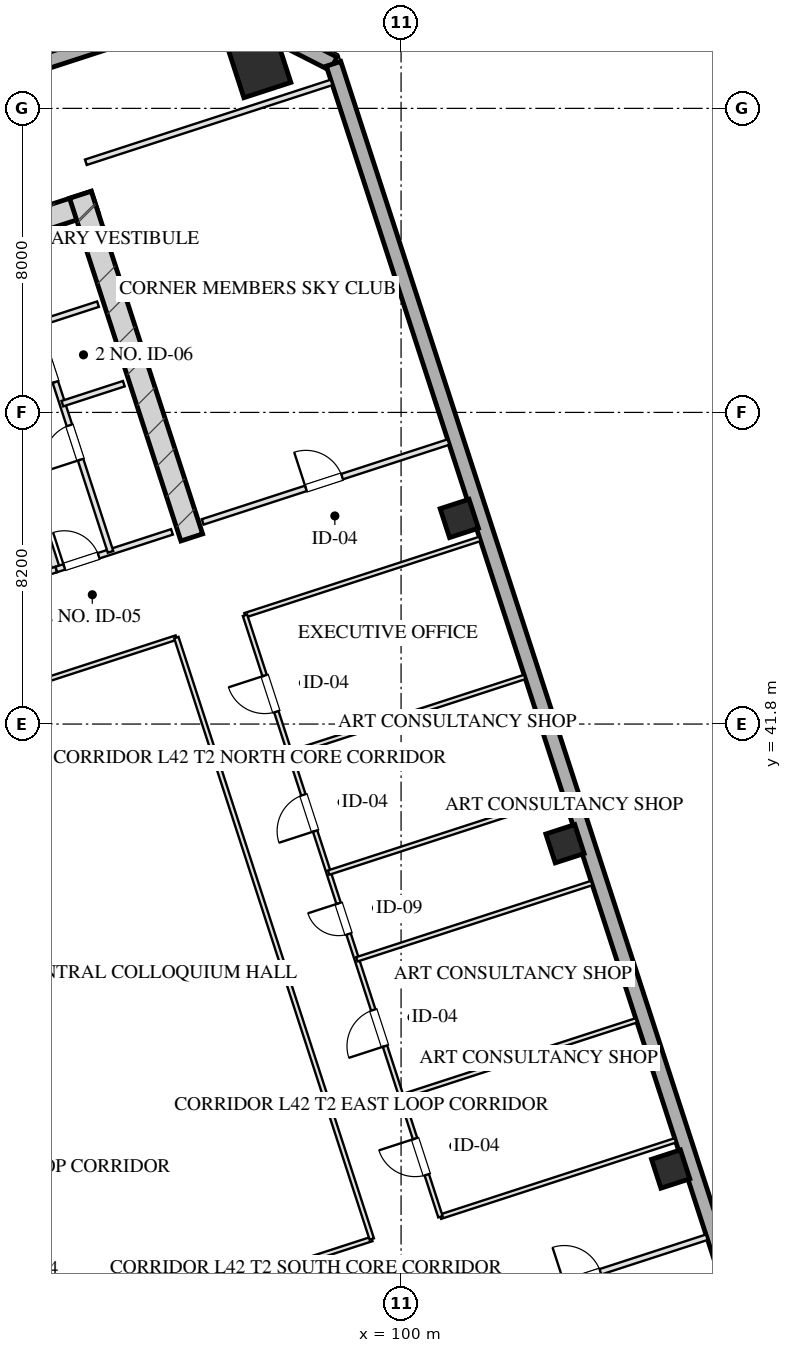
"""IFC4 building model, lengths in metres.
Left out: names, types, materials, properties, quantities, classifications, styles, units other than length and angle.
Written with IfcOpenShell. Run it as: python <this file> out.ifc"""

import sys

from ifc_helpers import new_model, si_unit, direction, frame, frame_2d, origin, origin_2d, place, context, subcontext, project, spatial, rectangle, hollow_rectangle, extrude, element, fill, save


model = new_model("IFC4")
c1 = context("Model", 3, precision=1e-05, world=origin(), true_north=direction((0.0, 1.0)))
c2 = subcontext(c1, "Body", "Model", "MODEL_VIEW")
j1 = project(units=[si_unit("LENGTHUNIT", "METRE"), si_unit("PLANEANGLEUNIT", "RADIAN")], contexts=[c1])
p1 = place(None, origin())
s1 = spatial("IfcSite", under=j1, at=p1, CompositionType="ELEMENT")
p2 = place(p1, origin())
s2 = spatial("IfcBuilding", under=s1, at=p2, CompositionType="ELEMENT")
p3 = place(p2, frame((0.0, 0.0, 159.85)))
s3 = spatial("IfcBuildingStorey", under=s2, at=p3, CompositionType="ELEMENT", Elevation=159.85)
p4 = place(p3, frame((76.344, 50.466, 0.0), z_axis=(0.0, 0.0, 1.0), x_axis=(0.951055727519, 0.309019421968, 0.0)))
e1 = element("IfcWall", 1, at=p4, inside=s3, PredefinedType="SHEAR", context=c2, shape_type="SweptSolid", body=[
    extrude(rectangle(XDim=16.4, YDim=0.6, at=frame_2d((8.2, 0.0))), origin(), (0.0, 0.0, 1.0), 3.45),
])
p5 = place(p3, frame((94.492, 46.71, 0.0), z_axis=(0.0, 0.0, 1.0), x_axis=(-0.309010370028, 0.95105866865, 0.0)))
e2 = element("IfcWall", 2, at=p5, inside=s3, PredefinedType="SHEAR", context=c2, shape_type="SweptSolid", body=[
    extrude(rectangle(XDim=9.48, YDim=0.6, at=frame_2d((4.74, 0.0))), origin(), (0.0, 0.0, 1.0), 3.45),
])
p6 = place(p3, frame((96.281, 59.099, 0.0), z_axis=(0.0, 0.0, 1.0), x_axis=(0.951056516295, 0.309016994375, 0.0)))
e3 = element("IfcColumn", 3, at=p6, inside=s3, PredefinedType="COLUMN", context=c2, shape_type="SweptSolid", body=[
    extrude(hollow_rectangle(XDim=1.3, YDim=1.3, WallThickness=0.045, at=origin_2d()), origin(), (0.0, 0.0, 1.0), 3.451),
])
for number, where, z_axis, x_axis in (
    (4, (107.094, 30.091, 0.0), (0.0, 0.0, 1.0), (0.951, 0.309, 0.0)),
    (5, (104.313, 38.651, 0.0), (0.0, 0.0, 1.0), (0.951, 0.309, 0.0)),
    (6, (101.532, 47.21, 0.0), (0.0, 0.0, 1.0), (0.951, 0.309, 0.0)),
):
    element("IfcColumn", number, at=place(p3, frame(where, z_axis=z_axis, x_axis=x_axis)), inside=s3, PredefinedType="COLUMN", context=c2, shape_type="SweptSolid", body=[
        extrude(hollow_rectangle(XDim=0.8, YDim=0.8, WallThickness=0.028, at=origin_2d()), origin(), (0.0, 0.0, 1.0), 3.451),
    ])
p7 = place(p3, frame((70.092, 52.556, 0.0), z_axis=(0.0, 0.0, 1.0), x_axis=(0.951057580055, 0.30901372044, 0.0)))
e7 = element("IfcWall", 7, at=p7, inside=s3, PredefinedType="SOLIDWALL", context=c2, shape_type="SweptSolid", body=[
    extrude(rectangle(XDim=26.4, YDim=0.4, at=frame_2d((13.2, 0.0))), origin(), (0.0, 0.0, 1.0), 2.61),
])
p8 = place(p3, frame((95.199, 60.714, 0.0), z_axis=(0.0, 0.0, 1.0), x_axis=(0.891020832027, -0.453962417932, 0.0)))
e8 = element("IfcWall", 8, at=p8, inside=s3, PredefinedType="SOLIDWALL", context=c2, shape_type="SweptSolid", body=[
    extrude(rectangle(XDim=3.394, YDim=0.4, at=frame_2d((1.697, 0.0))), origin(), (0.0, 0.0, 1.0), 2.61),
])
p9 = place(p3, frame((98.224, 59.173, 0.0), z_axis=(0.0, 0.0, 1.0), x_axis=(0.309014228706, -0.951057414911, 0.0)))
e9 = element("IfcWall", 9, at=p9, inside=s3, PredefinedType="SOLIDWALL", context=c2, shape_type="SweptSolid", body=[
    extrude(rectangle(XDim=42.8, YDim=0.4, at=frame_2d((21.4, 0.0))), origin(), (0.0, 0.0, 1.0), 2.61),
])
p10 = place(p3, frame((90.928, 45.868, 0.0), z_axis=(0.0, 0.0, 1.0), x_axis=(-0.309042196757, 0.951048327176, 0.0)))
e10 = element("IfcWall", 10, at=p10, inside=s3, PredefinedType="PARTITIONING", context=c2, shape_type="SweptSolid", body=[
    extrude(rectangle(XDim=8.43, YDim=0.2, at=frame_2d((4.215, 0.0))), origin(), (0.0, 0.0, 1.0), 3.175),
])
p11 = place(p3, frame((86.743, 44.508, 0.0), z_axis=(0.0, 0.0, 1.0), x_axis=(0.951063829732, 0.308994485023, 0.0)))
e11 = element("IfcWall", 11, at=p11, inside=s3, PredefinedType="PARTITIONING", context=c2, shape_type="SweptSolid", body=[
    extrude(rectangle(XDim=4.4, YDim=0.15, at=frame_2d((2.2, 0.0))), origin(), (0.0, 0.0, 1.0), 3.175),
])
p12 = place(p11, frame((1.45, 0.0, 0.0)))
e12 = element("IfcOpeningElement", 12, at=p12, cuts=e11, PredefinedType="OPENING", context=c2, shape_type="SweptSolid", body=[
    extrude(rectangle(XDim=1.5, YDim=2.05, at=frame_2d((0.75, 1.025))), frame((0.0, 0.085, 0.0), z_axis=(0.0, -1.0, 0.0), x_axis=(1.0, 0.0, 0.0)), (0.0, 0.0, 1.0), 0.17),
])
p13 = place(p3, frame((90.928, 45.868, 0.0), z_axis=(0.0, 0.0, 1.0), x_axis=(0.951059297078, 0.309008435874, 0.0)))
e13 = element("IfcWall", 13, at=p13, inside=s3, PredefinedType="PARTITIONING", context=c2, shape_type="SweptSolid", body=[
    extrude(rectangle(XDim=3.2, YDim=0.15, at=frame_2d((1.6, 0.0))), origin(), (0.0, 0.0, 1.0), 3.175),
])
p14 = place(p13, frame((0.22, 0.0, 0.0)))
e14 = element("IfcOpeningElement", 14, at=p14, cuts=e13, PredefinedType="OPENING", context=c2, shape_type="SweptSolid", body=[
    extrude(rectangle(XDim=0.95, YDim=2.05, at=frame_2d((0.475, 1.025))), frame((0.0, 0.085, 0.0), z_axis=(0.0, -1.0, 0.0), x_axis=(1.0, 0.0, 0.0)), (0.0, 0.0, 1.0), 0.17),
])
p15 = place(p3, frame((92.355, 46.331, 0.0), z_axis=(0.0, 0.0, 1.0), x_axis=(-0.309007490203, 0.951059604335, 0.0)))
e15 = element("IfcWall", 15, at=p15, inside=s3, PredefinedType="PARTITIONING", context=c2, shape_type="SweptSolid", body=[
    extrude(rectangle(XDim=8.43, YDim=0.15, at=frame_2d((4.215, 0.0))), origin(), (0.0, 0.0, 1.0), 3.175),
])
p16 = place(p15, frame((2.55, 0.0, 0.0)))
e16 = element("IfcOpeningElement", 16, at=p16, cuts=e15, PredefinedType="OPENING", context=c2, shape_type="SweptSolid", body=[
    extrude(rectangle(XDim=0.95, YDim=2.05, at=frame_2d((0.475, 1.025))), frame((0.0, 0.085, 0.0), z_axis=(0.0, -1.0, 0.0), x_axis=(1.0, 0.0, 0.0)), (0.0, 0.0, 1.0), 0.17),
])
p17 = place(p15, frame((4.7, 0.0, 0.0)))
e17 = element("IfcOpeningElement", 17, at=p17, cuts=e15, PredefinedType="OPENING", context=c2, shape_type="SweptSolid", body=[
    extrude(rectangle(XDim=0.9, YDim=2.05, at=frame_2d((0.45, 1.025))), frame((0.0, 0.085, 0.0), z_axis=(0.0, -1.0, 0.0), x_axis=(1.0, 0.0, 0.0)), (0.0, 0.0, 1.0), 0.17),
])
p18 = place(p15, frame((6.8, 0.0, 0.0)))
e18 = element("IfcOpeningElement", 18, at=p18, cuts=e15, PredefinedType="OPENING", context=c2, shape_type="SweptSolid", body=[
    extrude(rectangle(XDim=0.9, YDim=2.05, at=frame_2d((0.45, 1.025))), frame((0.0, 0.085, 0.0), z_axis=(0.0, -1.0, 0.0), x_axis=(1.0, 0.0, 0.0)), (0.0, 0.0, 1.0), 0.17),
])
p19 = place(p3, frame((91.088, 50.23, 0.0), z_axis=(0.0, 0.0, 1.0), x_axis=(0.951054116971, 0.309024378638, 0.0)))
e19 = element("IfcWall", 19, at=p19, inside=s3, PredefinedType="PARTITIONING", context=c2, shape_type="SweptSolid", body=[
    extrude(rectangle(XDim=1.7, YDim=0.15, at=frame_2d((0.85, 0.0))), origin(), (0.0, 0.0, 1.0), 3.175),
])
p20 = place(p3, frame((90.408, 52.323, 0.0), z_axis=(0.0, 0.0, 1.0), x_axis=(0.951040401051, 0.309066587596, 0.0)))
e20 = element("IfcWall", 20, at=p20, inside=s3, PredefinedType="PARTITIONING", context=c2, shape_type="SweptSolid", body=[
    extrude(rectangle(XDim=1.7, YDim=0.15, at=frame_2d((0.85, 0.0))), origin(), (0.0, 0.0, 1.0), 3.175),
])
p21 = place(p3, frame((101.578, 26.196, 0.0), z_axis=(0.0, 0.0, 1.0), x_axis=(0.951064934653, 0.308991084134, 0.0)))
e21 = element("IfcWall", 21, at=p21, inside=s3, PredefinedType="PARTITIONING", context=c2, shape_type="SweptSolid", body=[
    extrude(rectangle(XDim=6.8, YDim=0.15, at=frame_2d((3.4, 0.0))), origin(), (0.0, 0.0, 1.0), 3.175),
])
p22 = place(p21, frame((2.856, 0.0, 0.0)))
e22 = element("IfcOpeningElement", 22, at=p22, cuts=e21, PredefinedType="OPENING", context=c2, shape_type="SweptSolid", body=[
    extrude(rectangle(XDim=1.0, YDim=2.05, at=frame_2d((0.5, 1.025))), frame((0.0, 0.085, 0.0), z_axis=(0.0, -1.0, 0.0), x_axis=(1.0, 0.0, 0.0)), (0.0, 0.0, 1.0), 0.17),
])
p23 = place(p3, frame((91.705, 56.582, 0.0), z_axis=(0.0, 0.0, 1.0), x_axis=(0.951057811516, 0.309013008068, 0.0)))
e23 = element("IfcWall", 23, at=p23, inside=s3, PredefinedType="PARTITIONING", context=c2, shape_type="SweptSolid", body=[
    extrude(rectangle(XDim=6.8, YDim=0.15, at=frame_2d((3.4, 0.0))), origin(), (0.0, 0.0, 1.0), 3.175),
])
p24 = place(p3, frame((94.78, 47.119, 0.0), z_axis=(0.0, 0.0, 1.0), x_axis=(0.951057811516, 0.309013008068, 0.0)))
e24 = element("IfcWall", 24, at=p24, inside=s3, PredefinedType="PARTITIONING", context=c2, shape_type="SweptSolid", body=[
    extrude(rectangle(XDim=6.8, YDim=0.15, at=frame_2d((3.4, 0.0))), origin(), (0.0, 0.0, 1.0), 3.175),
])
p25 = place(p24, frame((2.856, 0.0, 0.0)))
e25 = element("IfcOpeningElement", 25, at=p25, cuts=e24, PredefinedType="OPENING", context=c2, shape_type="SweptSolid", body=[
    extrude(rectangle(XDim=1.0, YDim=2.05, at=frame_2d((0.5, 1.025))), frame((0.0, 0.085, 0.0), z_axis=(0.0, -1.0, 0.0), x_axis=(1.0, 0.0, 0.0)), (0.0, 0.0, 1.0), 0.17),
])
p26 = place(p3, frame((91.382, 25.701, 0.0), z_axis=(0.0, 0.0, 1.0), x_axis=(0.951061683147, 0.309001091988, 0.0)))
e26 = element("IfcWall", 26, at=p26, inside=s3, PredefinedType="PARTITIONING", context=c2, shape_type="SweptSolid", body=[
    extrude(rectangle(XDim=8.25, YDim=0.12, at=frame_2d((4.125, 0.0))), origin(), (0.0, 0.0, 1.0), 3.175),
])
p27 = place(p3, frame((101.035, 28.837, 0.0), z_axis=(0.0, 0.0, 1.0), x_axis=(0.95104869662, 0.309041059824, 0.0)))
e27 = element("IfcWall", 27, at=p27, inside=s3, PredefinedType="PARTITIONING", context=c2, shape_type="SweptSolid", body=[
    extrude(rectangle(XDim=6.5, YDim=0.12, at=frame_2d((3.25, 0.0))), origin(), (0.0, 0.0, 1.0), 3.175),
])
p28 = place(p3, frame((86.24, 41.527, 0.0), z_axis=(0.0, 0.0, 1.0), x_axis=(0.951058857521, 0.309009788731, 0.0)))
e28 = element("IfcWall", 28, at=p28, inside=s3, PredefinedType="PARTITIONING", context=c2, shape_type="SweptSolid", body=[
    extrude(rectangle(XDim=8.25, YDim=0.12, at=frame_2d((4.125, 0.0))), origin(), (0.0, 0.0, 1.0), 3.175),
])
p29 = place(p3, frame((95.893, 44.663, 0.0), z_axis=(0.0, 0.0, 1.0), x_axis=(0.951059735424, 0.30900708674, 0.0)))
e29 = element("IfcWall", 29, at=p29, inside=s3, PredefinedType="PARTITIONING", context=c2, shape_type="SweptSolid", body=[
    extrude(rectangle(XDim=6.5, YDim=0.12, at=frame_2d((3.25, 0.0))), origin(), (0.0, 0.0, 1.0), 3.175),
])
p30 = place(p3, frame((91.382, 25.701, 0.0), z_axis=(0.0, 0.0, 1.0), x_axis=(-0.309004459387, 0.951060589068, 0.0)))
e30 = element("IfcWall", 30, at=p30, inside=s3, PredefinedType="PARTITIONING", context=c2, shape_type="SweptSolid", body=[
    extrude(rectangle(XDim=16.64, YDim=0.12, at=frame_2d((8.32, 0.0))), origin(), (0.0, 0.0, 1.0), 3.175),
])
p31 = place(p30, frame((7.987, 0.0, 0.0)))
e31 = element("IfcOpeningElement", 31, at=p31, cuts=e30, PredefinedType="OPENING", context=c2, shape_type="SweptSolid", body=[
    extrude(rectangle(XDim=1.1, YDim=2.05, at=frame_2d((0.55, 1.025))), frame((0.0, 0.07, 0.0), z_axis=(0.0, -1.0, 0.0), x_axis=(1.0, 0.0, 0.0)), (0.0, 0.0, 1.0), 0.14),
])
p32 = place(p3, frame((99.229, 28.25, 0.0), z_axis=(0.0, 0.0, 1.0), x_axis=(-0.30901773025, 0.951056277195, 0.0)))
e32 = element("IfcWall", 32, at=p32, inside=s3, PredefinedType="PARTITIONING", context=c2, shape_type="SweptSolid", body=[
    extrude(rectangle(XDim=16.64, YDim=0.12, at=frame_2d((8.32, 0.0))), origin(), (0.0, 0.0, 1.0), 3.175),
])
p33 = place(p3, frame((101.035, 28.837, 0.0), z_axis=(0.0, 0.0, 1.0), x_axis=(-0.30901773025, 0.951056277195, 0.0)))
e33 = element("IfcWall", 33, at=p33, inside=s3, PredefinedType="PARTITIONING", context=c2, shape_type="SweptSolid", body=[
    extrude(rectangle(XDim=16.64, YDim=0.12, at=frame_2d((8.32, 0.0))), origin(), (0.0, 0.0, 1.0), 3.175),
])
p34 = place(p33, frame((1.16, 0.0, 0.0)))
e34 = element("IfcOpeningElement", 34, at=p34, cuts=e33, PredefinedType="OPENING", context=c2, shape_type="SweptSolid", body=[
    extrude(rectangle(XDim=1.0, YDim=2.05, at=frame_2d((0.5, 1.025))), frame((0.0, 0.07, 0.0), z_axis=(0.0, -1.0, 0.0), x_axis=(1.0, 0.0, 0.0)), (0.0, 0.0, 1.0), 0.14),
])
p35 = place(p33, frame((4.72, 0.0, 0.0)))
e35 = element("IfcOpeningElement", 35, at=p35, cuts=e33, PredefinedType="OPENING", context=c2, shape_type="SweptSolid", body=[
    extrude(rectangle(XDim=1.0, YDim=2.05, at=frame_2d((0.5, 1.025))), frame((0.0, 0.07, 0.0), z_axis=(0.0, -1.0, 0.0), x_axis=(1.0, 0.0, 0.0)), (0.0, 0.0, 1.0), 0.14),
])
p36 = place(p33, frame((7.82, 0.0, 0.0)))
e36 = element("IfcOpeningElement", 36, at=p36, cuts=e33, PredefinedType="OPENING", context=c2, shape_type="SweptSolid", body=[
    extrude(rectangle(XDim=0.85, YDim=2.05, at=frame_2d((0.425, 1.025))), frame((0.0, 0.07, 0.0), z_axis=(0.0, -1.0, 0.0), x_axis=(1.0, 0.0, 0.0)), (0.0, 0.0, 1.0), 0.14),
])
p37 = place(p33, frame((10.671, 0.0, 0.0)))
e37 = element("IfcOpeningElement", 37, at=p37, cuts=e33, PredefinedType="OPENING", context=c2, shape_type="SweptSolid", body=[
    extrude(rectangle(XDim=1.0, YDim=2.05, at=frame_2d((0.5, 1.025))), frame((0.0, 0.07, 0.0), z_axis=(0.0, -1.0, 0.0), x_axis=(1.0, 0.0, 0.0)), (0.0, 0.0, 1.0), 0.14),
])
p38 = place(p33, frame((13.971, 0.0, 0.0)))
e38 = element("IfcOpeningElement", 38, at=p38, cuts=e33, PredefinedType="OPENING", context=c2, shape_type="SweptSolid", body=[
    extrude(rectangle(XDim=1.0, YDim=2.05, at=frame_2d((0.5, 1.025))), frame((0.0, 0.07, 0.0), z_axis=(0.0, -1.0, 0.0), x_axis=(1.0, 0.0, 0.0)), (0.0, 0.0, 1.0), 0.14),
])
for number, where, z_axis, x_axis in (
    (39, (100.01, 31.995, 0.0), (0.0, 0.0, 1.0), (0.951, 0.309, 0.0)),
    (40, (98.835, 35.609, 0.0), (0.0, 0.0, 1.0), (0.951, 0.309, 0.0)),
    (41, (98.094, 37.892, 0.0), (0.0, 0.0, 1.0), (0.951, 0.309, 0.0)),
    (42, (97.073, 41.031, 0.0), (0.0, 0.0, 1.0), (0.951, 0.309, 0.0)),
):
    element("IfcWall", number, at=place(p3, frame(where, z_axis=z_axis, x_axis=x_axis)), inside=s3, PredefinedType="PARTITIONING", context=c2, shape_type="SweptSolid", body=[
        extrude(rectangle(XDim=6.5, YDim=0.12, at=frame_2d((3.25, 0.0))), origin(), (0.0, 0.0, 1.0), 3.175),
    ])
p39 = place(p14, origin())
e43 = element("IfcDoor", 43, at=p39, inside=s3, OperationType="SINGLE_SWING_LEFT", PredefinedType="DOOR", context=c2, shape_type="SweptSolid", body=[
    extrude(rectangle(XDim=0.95, YDim=2.05, at=frame_2d((0.475, 1.025))), frame((0.0, 0.025, 0.0), z_axis=(0.0, -1.0, 0.0), x_axis=(1.0, 0.0, 0.0)), (0.0, 0.0, 1.0), 0.05),
])
fill(e14, e43)
p40 = place(p16, origin())
e44 = element("IfcDoor", 44, at=p40, inside=s3, OperationType="SINGLE_SWING_LEFT", PredefinedType="DOOR", context=c2, shape_type="SweptSolid", body=[
    extrude(rectangle(XDim=0.95, YDim=2.05, at=frame_2d((0.475, 1.025))), frame((0.0, 0.025, 0.0), z_axis=(0.0, -1.0, 0.0), x_axis=(1.0, 0.0, 0.0)), (0.0, 0.0, 1.0), 0.05),
])
fill(e16, e44)
p41 = place(p17, origin())
e45 = element("IfcDoor", 45, at=p41, inside=s3, OperationType="SINGLE_SWING_LEFT", PredefinedType="DOOR", context=c2, shape_type="SweptSolid", body=[
    extrude(rectangle(XDim=0.9, YDim=2.05, at=frame_2d((0.45, 1.025))), frame((0.0, 0.025, 0.0), z_axis=(0.0, -1.0, 0.0), x_axis=(1.0, 0.0, 0.0)), (0.0, 0.0, 1.0), 0.05),
])
fill(e17, e45)
p42 = place(p22, origin())
e46 = element("IfcDoor", 46, at=p42, inside=s3, OperationType="SINGLE_SWING_LEFT", PredefinedType="DOOR", context=c2, shape_type="SweptSolid", body=[
    extrude(rectangle(XDim=1.0, YDim=2.05, at=frame_2d((0.5, 1.025))), frame((0.0, 0.025, 0.0), z_axis=(0.0, -1.0, 0.0), x_axis=(1.0, 0.0, 0.0)), (0.0, 0.0, 1.0), 0.05),
])
fill(e22, e46)
p43 = place(p25, origin())
e47 = element("IfcDoor", 47, at=p43, inside=s3, OperationType="SINGLE_SWING_LEFT", PredefinedType="DOOR", context=c2, shape_type="SweptSolid", body=[
    extrude(rectangle(XDim=1.0, YDim=2.05, at=frame_2d((0.5, 1.025))), frame((0.0, 0.025, 0.0), z_axis=(0.0, -1.0, 0.0), x_axis=(1.0, 0.0, 0.0)), (0.0, 0.0, 1.0), 0.05),
])
fill(e25, e47)
p44 = place(p34, origin())
e48 = element("IfcDoor", 48, at=p44, inside=s3, OperationType="SINGLE_SWING_RIGHT", PredefinedType="DOOR", context=c2, shape_type="SweptSolid", body=[
    extrude(rectangle(XDim=1.0, YDim=2.05, at=frame_2d((0.5, 1.025))), frame((0.0, 0.025, 0.0), z_axis=(0.0, -1.0, 0.0), x_axis=(1.0, 0.0, 0.0)), (0.0, 0.0, 1.0), 0.05),
])
fill(e34, e48)
p45 = place(p35, origin())
e49 = element("IfcDoor", 49, at=p45, inside=s3, OperationType="SINGLE_SWING_LEFT", PredefinedType="DOOR", context=c2, shape_type="SweptSolid", body=[
    extrude(rectangle(XDim=1.0, YDim=2.05, at=frame_2d((0.5, 1.025))), frame((0.0, 0.025, 0.0), z_axis=(0.0, -1.0, 0.0), x_axis=(1.0, 0.0, 0.0)), (0.0, 0.0, 1.0), 0.05),
])
fill(e35, e49)
p46 = place(p36, origin())
e50 = element("IfcDoor", 50, at=p46, inside=s3, OperationType="SINGLE_SWING_RIGHT", PredefinedType="DOOR", context=c2, shape_type="SweptSolid", body=[
    extrude(rectangle(XDim=0.85, YDim=2.05, at=frame_2d((0.425, 1.025))), frame((0.0, 0.025, 0.0), z_axis=(0.0, -1.0, 0.0), x_axis=(1.0, 0.0, 0.0)), (0.0, 0.0, 1.0), 0.05),
])
fill(e36, e50)
p47 = place(p37, origin())
e51 = element("IfcDoor", 51, at=p47, inside=s3, OperationType="SINGLE_SWING_LEFT", PredefinedType="DOOR", context=c2, shape_type="SweptSolid", body=[
    extrude(rectangle(XDim=1.0, YDim=2.05, at=frame_2d((0.5, 1.025))), frame((0.0, 0.025, 0.0), z_axis=(0.0, -1.0, 0.0), x_axis=(1.0, 0.0, 0.0)), (0.0, 0.0, 1.0), 0.05),
])
fill(e37, e51)
p48 = place(p38, origin())
e52 = element("IfcDoor", 52, at=p48, inside=s3, OperationType="SINGLE_SWING_RIGHT", PredefinedType="DOOR", context=c2, shape_type="SweptSolid", body=[
    extrude(rectangle(XDim=1.0, YDim=2.05, at=frame_2d((0.5, 1.025))), frame((0.0, 0.025, 0.0), z_axis=(0.0, -1.0, 0.0), x_axis=(1.0, 0.0, 0.0)), (0.0, 0.0, 1.0), 0.05),
])
fill(e38, e52)
save(model, sys.argv[1])
